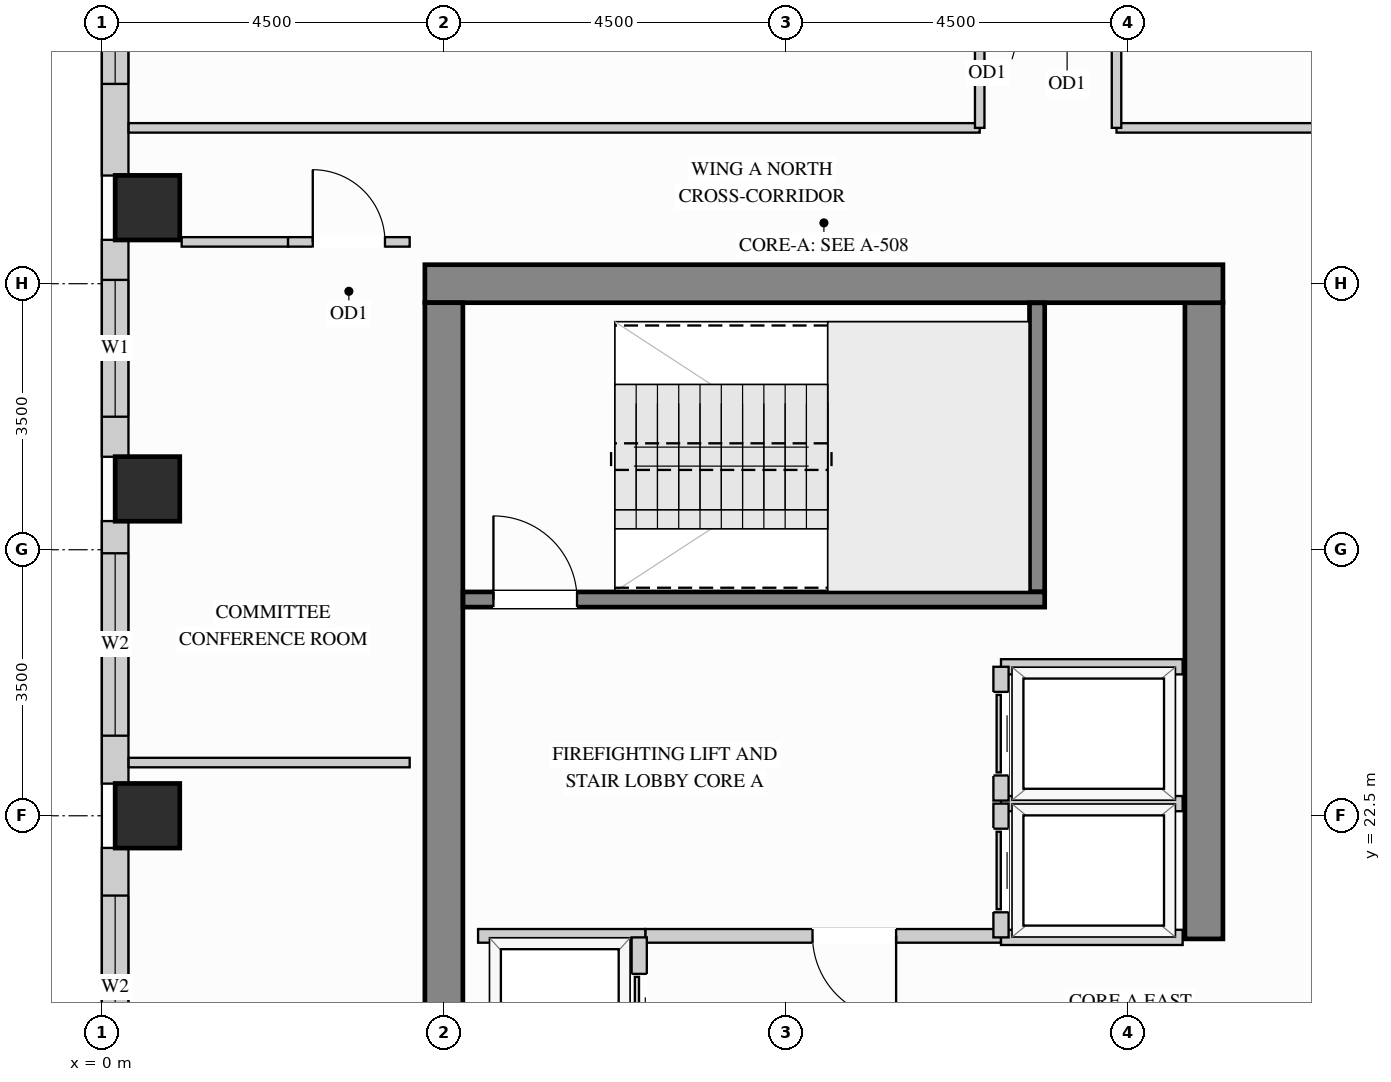
"""IFC4 building model, lengths in metres.
Left out: names, types, materials, properties, quantities, classifications, styles, units other than length and angle.
Written with IfcOpenShell. Run it as: python <this file> out.ifc"""

import sys

from ifc_helpers import new_model, si_unit, direction, frame, frame_2d, origin, origin_2d, place, context, subcontext, project, spatial, rectangle, extrude, source, transform, mapped, element, fill, save


model = new_model("IFC4")
c1 = context("Model", 3, precision=1e-05, world=origin(), true_north=direction((0.0, 1.0)))
c2 = subcontext(c1, "Body", "Model", "MODEL_VIEW")
j1 = project(units=[si_unit("LENGTHUNIT", "METRE"), si_unit("PLANEANGLEUNIT", "RADIAN")], contexts=[c1])
p1 = place(None, origin())
s1 = spatial("IfcSite", under=j1, at=p1, CompositionType="ELEMENT")
p2 = place(p1, origin())
s2 = spatial("IfcBuilding", under=s1, at=p2, CompositionType="ELEMENT")
p3 = place(p2, frame((0.0, 0.0, 223.2)))
s3 = spatial("IfcBuildingStorey", under=s2, at=p3, CompositionType="ELEMENT", Elevation=223.2)
m1 = source(origin(), c2, "Body", "SweptSolid", [
    extrude(rectangle(XDim=0.85, YDim=0.85, at=origin_2d()), origin(), (0.0, 0.0, 1.0), 3.4),
])
for number, where, z_axis, x_axis in (
    (1, (0.6, 22.5, 0.0), (0.0, 0.0, 1.0), (1.0, 0.0, 0.0)),
    (2, (0.6, 26.8, 0.0), (0.0, 0.0, 1.0), (1.0, 0.0, 0.0)),
    (3, (0.6, 30.5, 0.0), (0.0, 0.0, 1.0), (1.0, 0.0, 0.0)),
):
    element("IfcColumn", number, at=place(p3, frame(where, z_axis=z_axis, x_axis=x_axis)), inside=s3, PredefinedType="COLUMN", context=c2, shape_type="MappedRepresentation", body=[
        mapped(m1, transform((0.0, 0.0, 0.0), x_axis=(1.0, 0.0, 0.0), y_axis=(0.0, 1.0, 0.0), z_axis=(0.0, 0.0, 1.0))),
    ])
m2 = source(origin(), c2, "Body", "SweptSolid", [
    extrude(rectangle(XDim=8.37, YDim=0.5, at=frame_2d((4.185, 0.0))), origin(), (0.0, 0.0, 1.0), 3.4),
])
p4 = place(p3, frame((14.5, 20.88, 0.0), z_axis=(0.0, 0.0, 1.0), x_axis=(0.0, 1.0, 0.0)))
e4 = element("IfcWall", 4, at=p4, inside=s3, PredefinedType="SHEAR", context=c2, shape_type="MappedRepresentation", body=[
    mapped(m2, transform((0.0, 0.0, 0.0), x_axis=(1.0, 0.0, 0.0), y_axis=(0.0, 1.0, 0.0), z_axis=(0.0, 0.0, 1.0))),
])
m3 = source(origin(), c2, "Body", "SweptSolid", [
    extrude(rectangle(XDim=10.5, YDim=0.5, at=frame_2d((5.25, 0.0))), origin(), (0.0, 0.0, 1.0), 3.4),
])
p5 = place(p3, frame((4.25, 29.5, 0.0), z_axis=(0.0, 0.0, 1.0), x_axis=(1.0, 0.0, 0.0)))
e5 = element("IfcWall", 5, at=p5, inside=s3, PredefinedType="SHEAR", context=c2, shape_type="MappedRepresentation", body=[
    mapped(m3, transform((0.0, 0.0, 0.0), x_axis=(1.0, 0.0, 0.0), y_axis=(0.0, 1.0, 0.0), z_axis=(0.0, 0.0, 1.0))),
])
m4 = source(origin(), c2, "Body", "SweptSolid", [
    extrude(rectangle(XDim=20.5, YDim=0.5, at=frame_2d((10.25, 0.0))), origin(), (0.0, 0.0, 1.0), 3.4),
])
p6 = place(p3, frame((4.5, 8.75, 0.0), z_axis=(0.0, 0.0, 1.0), x_axis=(0.0, 1.0, 0.0)))
e6 = element("IfcWall", 6, at=p6, inside=s3, PredefinedType="SHEAR", context=c2, shape_type="MappedRepresentation", body=[
    mapped(m4, transform((0.0, 0.0, 0.0), x_axis=(1.0, 0.0, 0.0), y_axis=(0.0, 1.0, 0.0), z_axis=(0.0, 0.0, 1.0))),
])
p7 = place(p3, frame((0.175, 34.577, 0.0), z_axis=(0.0, 0.0, 1.0), x_axis=(0.0, -1.0, 0.0)))
e7 = element("IfcWall", 7, at=p7, inside=s3, PredefinedType="SOLIDWALL", context=c2, shape_type="SweptSolid", body=[
    extrude(rectangle(XDim=3.654, YDim=0.35, at=frame_2d((1.827, 0.0))), origin(), (0.0, 0.0, 1.0), 3.385),
])
p8 = place(p7, frame((0.648, 0.0, 0.78)))
e8 = element("IfcOpeningElement", 8, at=p8, cuts=e7, PredefinedType="OPENING", context=c2, shape_type="SweptSolid", body=[
    extrude(rectangle(XDim=1.8, YDim=2.1, at=frame_2d((0.9, 1.05))), frame((0.0, 0.185, 0.0), z_axis=(0.0, -1.0, 0.0), x_axis=(1.0, 0.0, 0.0)), (0.0, 0.0, 1.0), 0.37),
])
p9 = place(p3, frame((0.175, 30.077, 0.0), z_axis=(0.0, 0.0, 1.0), x_axis=(0.0, -1.0, 0.0)))
e9 = element("IfcWall", 9, at=p9, inside=s3, PredefinedType="SOLIDWALL", context=c2, shape_type="SweptSolid", body=[
    extrude(rectangle(XDim=2.854, YDim=0.35, at=frame_2d((1.427, 0.0))), origin(), (0.0, 0.0, 1.0), 3.385),
])
p10 = place(p9, frame((0.527, 0.0, 0.78)))
e10 = element("IfcOpeningElement", 10, at=p10, cuts=e9, PredefinedType="OPENING", context=c2, shape_type="SweptSolid", body=[
    extrude(rectangle(XDim=1.8, YDim=2.1, at=frame_2d((0.9, 1.05))), frame((0.0, 0.185, 0.0), z_axis=(0.0, -1.0, 0.0), x_axis=(1.0, 0.0, 0.0)), (0.0, 0.0, 1.0), 0.37),
])
p11 = place(p3, frame((0.175, 26.377, 0.0), z_axis=(0.0, 0.0, 1.0), x_axis=(0.0, -1.0, 0.0)))
e11 = element("IfcWall", 11, at=p11, inside=s3, PredefinedType="SOLIDWALL", context=c2, shape_type="SweptSolid", body=[
    extrude(rectangle(XDim=3.454, YDim=0.35, at=frame_2d((1.727, 0.0))), origin(), (0.0, 0.0, 1.0), 3.385),
])
p12 = place(p11, frame((0.424, 0.0, 0.78)))
e12 = element("IfcOpeningElement", 12, at=p12, cuts=e11, PredefinedType="OPENING", context=c2, shape_type="SweptSolid", body=[
    extrude(rectangle(XDim=2.4, YDim=2.1, at=frame_2d((1.2, 1.05))), frame((0.0, 0.185, 0.0), z_axis=(0.0, -1.0, 0.0), x_axis=(1.0, 0.0, 0.0)), (0.0, 0.0, 1.0), 0.37),
])
p13 = place(p3, frame((0.175, 22.077, 0.0), z_axis=(0.0, 0.0, 1.0), x_axis=(0.0, -1.0, 0.0)))
e13 = element("IfcWall", 13, at=p13, inside=s3, PredefinedType="SOLIDWALL", context=c2, shape_type="SweptSolid", body=[
    extrude(rectangle(XDim=3.654, YDim=0.35, at=frame_2d((1.827, 0.0))), origin(), (0.0, 0.0, 1.0), 3.385),
])
p14 = place(p13, frame((0.627, 0.0, 0.78)))
e14 = element("IfcOpeningElement", 14, at=p14, cuts=e13, PredefinedType="OPENING", context=c2, shape_type="SweptSolid", body=[
    extrude(rectangle(XDim=2.4, YDim=2.1, at=frame_2d((1.2, 1.05))), frame((0.0, 0.185, 0.0), z_axis=(0.0, -1.0, 0.0), x_axis=(1.0, 0.0, 0.0)), (0.0, 0.0, 1.0), 0.37),
])
p15 = place(p3, frame((7.15, 20.92, 0.0), z_axis=(0.0, 0.0, 1.0), x_axis=(1.0, 0.0, 0.0)))
e15 = element("IfcWall", 15, at=p15, inside=s3, PredefinedType="PARTITIONING", context=c2, shape_type="SweptSolid", body=[
    extrude(rectangle(XDim=4.68, YDim=0.18, at=frame_2d((2.34, 0.0))), origin(), (0.0, 0.0, 1.0), 3.385),
])
p16 = place(p15, frame((2.2, 0.0, 0.0)))
e16 = element("IfcOpeningElement", 16, at=p16, cuts=e15, PredefinedType="OPENING", context=c2, shape_type="SweptSolid", body=[
    extrude(rectangle(XDim=1.1, YDim=2.15, at=frame_2d((0.55, 1.075))), frame((0.0, 0.1, 0.0), z_axis=(0.0, -1.0, 0.0), x_axis=(1.0, 0.0, 0.0)), (0.0, 0.0, 1.0), 0.2),
])
m5 = source(origin(), c2, "Body", "SweptSolid", [
    extrude(rectangle(XDim=2.2, YDim=0.18, at=frame_2d((1.1, 0.0))), origin(), (0.0, 0.0, 1.0), 3.385),
])
p17 = place(p3, frame((4.95, 20.92, 0.0), z_axis=(0.0, 0.0, 1.0), x_axis=(1.0, 0.0, 0.0)))
e17 = element("IfcWall", 17, at=p17, inside=s3, PredefinedType="PARTITIONING", context=c2, shape_type="MappedRepresentation", body=[
    mapped(m5, transform((0.0, 0.0, 0.0), x_axis=(1.0, 0.0, 0.0), y_axis=(0.0, 1.0, 0.0), z_axis=(0.0, 0.0, 1.0))),
])
m6 = source(origin(), c2, "Body", "SweptSolid", [
    extrude(rectangle(XDim=5.798, YDim=0.125, at=frame_2d((2.899, 0.0))), origin(), (0.0, 0.0, 1.0), 3.385),
])
p18 = place(p3, frame((13.35, 31.55, 0.0), z_axis=(0.0, 0.0, 1.0), x_axis=(1.0, 0.0, 0.0)))
e18 = element("IfcWall", 18, at=p18, inside=s3, PredefinedType="PARTITIONING", context=c2, shape_type="MappedRepresentation", body=[
    mapped(m6, transform((0.0, 0.0, 0.0), x_axis=(1.0, 0.0, 0.0), y_axis=(0.0, 1.0, 0.0), z_axis=(0.0, 0.0, 1.0))),
])
m7 = source(origin(), c2, "Body", "SweptSolid", [
    extrude(rectangle(XDim=11.198, YDim=0.125, at=frame_2d((5.599, 0.0))), origin(), (0.0, 0.0, 1.0), 3.385),
])
p19 = place(p3, frame((0.352, 31.55, 0.0), z_axis=(0.0, 0.0, 1.0), x_axis=(1.0, 0.0, 0.0)))
e19 = element("IfcWall", 19, at=p19, inside=s3, PredefinedType="PARTITIONING", context=c2, shape_type="MappedRepresentation", body=[
    mapped(m7, transform((0.0, 0.0, 0.0), x_axis=(1.0, 0.0, 0.0), y_axis=(0.0, 1.0, 0.0), z_axis=(0.0, 0.0, 1.0))),
])
m8 = source(origin(), c2, "Body", "SweptSolid", [
    extrude(rectangle(XDim=1.4, YDim=0.125, at=frame_2d((0.7, 0.0))), origin(), (0.0, 0.0, 1.0), 3.385),
])
p20 = place(p3, frame((1.05, 30.05, 0.0), z_axis=(0.0, 0.0, 1.0), x_axis=(1.0, 0.0, 0.0)))
e20 = element("IfcWall", 20, at=p20, inside=s3, PredefinedType="PARTITIONING", context=c2, shape_type="MappedRepresentation", body=[
    mapped(m8, transform((0.0, 0.0, 0.0), x_axis=(1.0, 0.0, 0.0), y_axis=(0.0, 1.0, 0.0), z_axis=(0.0, 0.0, 1.0))),
])
p21 = place(p3, frame((2.45, 30.05, 0.0), z_axis=(0.0, 0.0, 1.0), x_axis=(1.0, 0.0, 0.0)))
e21 = element("IfcWall", 21, at=p21, inside=s3, PredefinedType="PARTITIONING", context=c2, shape_type="SweptSolid", body=[
    extrude(rectangle(XDim=1.6, YDim=0.125, at=frame_2d((0.8, 0.0))), origin(), (0.0, 0.0, 1.0), 3.385),
])
p22 = place(p21, frame((0.325, 0.0, 0.0)))
e22 = element("IfcOpeningElement", 22, at=p22, cuts=e21, PredefinedType="OPENING", context=c2, shape_type="SweptSolid", body=[
    extrude(rectangle(XDim=0.95, YDim=2.15, at=frame_2d((0.475, 1.075))), frame((0.0, 0.073, 0.0), z_axis=(0.0, -1.0, 0.0), x_axis=(1.0, 0.0, 0.0)), (0.0, 0.0, 1.0), 0.145),
])
p23 = place(p3, frame((13.35, 31.55, 0.0), z_axis=(0.0, 0.0, 1.0), x_axis=(0.0, 1.0, 0.0)))
e23 = element("IfcWall", 23, at=p23, inside=s3, PredefinedType="PARTITIONING", context=c2, shape_type="SweptSolid", body=[
    extrude(rectangle(XDim=3.35, YDim=0.125, at=frame_2d((1.675, 0.0))), origin(), (0.0, 0.0, 1.0), 3.385),
])
p24 = place(p23, frame((1.2, 0.0, 0.0)))
e24 = element("IfcOpeningElement", 24, at=p24, cuts=e23, PredefinedType="OPENING", context=c2, shape_type="SweptSolid", body=[
    extrude(rectangle(XDim=0.95, YDim=2.15, at=frame_2d((0.475, 1.075))), frame((0.0, 0.073, 0.0), z_axis=(0.0, -1.0, 0.0), x_axis=(1.0, 0.0, 0.0)), (0.0, 0.0, 1.0), 0.145),
])
p25 = place(p3, frame((11.55, 31.55, 0.0), z_axis=(0.0, 0.0, 1.0), x_axis=(0.0, 1.0, 0.0)))
e25 = element("IfcWall", 25, at=p25, inside=s3, PredefinedType="PARTITIONING", context=c2, shape_type="SweptSolid", body=[
    extrude(rectangle(XDim=3.35, YDim=0.125, at=frame_2d((1.675, 0.0))), origin(), (0.0, 0.0, 1.0), 3.385),
])
p26 = place(p25, frame((1.2, 0.0, 0.0)))
e26 = element("IfcOpeningElement", 26, at=p26, cuts=e25, PredefinedType="OPENING", context=c2, shape_type="SweptSolid", body=[
    extrude(rectangle(XDim=0.95, YDim=2.15, at=frame_2d((0.475, 1.075))), frame((0.0, 0.073, 0.0), z_axis=(0.0, -1.0, 0.0), x_axis=(1.0, 0.0, 0.0)), (0.0, 0.0, 1.0), 0.145),
])
m9 = source(origin(), c2, "Body", "SweptSolid", [
    extrude(rectangle(XDim=3.698, YDim=0.125, at=frame_2d((1.849, 0.0))), origin(), (0.0, 0.0, 1.0), 3.385),
])
p27 = place(p3, frame((0.352, 23.2, 0.0), z_axis=(0.0, 0.0, 1.0), x_axis=(1.0, 0.0, 0.0)))
e27 = element("IfcWall", 27, at=p27, inside=s3, PredefinedType="PARTITIONING", context=c2, shape_type="MappedRepresentation", body=[
    mapped(m9, transform((0.0, 0.0, 0.0), x_axis=(1.0, 0.0, 0.0), y_axis=(0.0, 1.0, 0.0), z_axis=(0.0, 0.0, 1.0))),
])
m10 = source(origin(), c2, "Body", "SweptSolid", [
    extrude(rectangle(XDim=2.39, YDim=0.2, at=frame_2d((1.195, 0.0))), origin(), (0.0, 0.0, 1.0), 3.385),
])
for number, where, z_axis, x_axis in (
    (28, (11.83, 22.66, 0.0), (0.0, 0.0, 1.0), (1.0, 0.0, 0.0)),
    (29, (11.83, 20.9, 0.0), (0.0, 0.0, 1.0), (1.0, 0.0, 0.0)),
):
    element("IfcWall", number, at=place(p3, frame(where, z_axis=z_axis, x_axis=x_axis)), inside=s3, PredefinedType="PARTITIONING", context=c2, shape_type="MappedRepresentation", body=[
        mapped(m10, transform((0.0, 0.0, 0.0), x_axis=(1.0, 0.0, 0.0), y_axis=(0.0, 1.0, 0.0), z_axis=(0.0, 0.0, 1.0))),
    ])
p28 = place(p3, frame((11.83, 20.9, 0.0), z_axis=(0.0, 0.0, 1.0), x_axis=(0.0, 1.0, 0.0)))
e30 = element("IfcWall", 30, at=p28, inside=s3, PredefinedType="PARTITIONING", context=c2, shape_type="SweptSolid", body=[
    extrude(rectangle(XDim=1.76, YDim=0.2, at=frame_2d((0.88, 0.0))), origin(), (0.0, 0.0, 1.0), 3.385),
])
p29 = place(p28, frame((0.33, 0.0, 0.0)))
e31 = element("IfcOpeningElement", 31, at=p29, cuts=e30, PredefinedType="OPENING", context=c2, shape_type="SweptSolid", body=[
    extrude(rectangle(XDim=1.1, YDim=2.2, at=frame_2d((0.55, 1.1))), frame((0.0, 0.11, 0.0), z_axis=(0.0, -1.0, 0.0), x_axis=(1.0, 0.0, 0.0)), (0.0, 0.0, 1.0), 0.22),
])
p30 = place(p3, frame((11.83, 24.46, 0.0), z_axis=(0.0, 0.0, 1.0), x_axis=(1.0, 0.0, 0.0)))
e32 = element("IfcWall", 32, at=p30, inside=s3, PredefinedType="PARTITIONING", context=c2, shape_type="MappedRepresentation", body=[
    mapped(m10, transform((0.0, 0.0, 0.0), x_axis=(1.0, 0.0, 0.0), y_axis=(0.0, 1.0, 0.0), z_axis=(0.0, 0.0, 1.0))),
])
p31 = place(p3, frame((11.83, 22.7, 0.0), z_axis=(0.0, 0.0, 1.0), x_axis=(0.0, 1.0, 0.0)))
e33 = element("IfcWall", 33, at=p31, inside=s3, PredefinedType="PARTITIONING", context=c2, shape_type="SweptSolid", body=[
    extrude(rectangle(XDim=1.76, YDim=0.2, at=frame_2d((0.88, 0.0))), origin(), (0.0, 0.0, 1.0), 3.385),
])
p32 = place(p31, frame((0.33, 0.0, 0.0)))
e34 = element("IfcOpeningElement", 34, at=p32, cuts=e33, PredefinedType="OPENING", context=c2, shape_type="SweptSolid", body=[
    extrude(rectangle(XDim=1.1, YDim=2.2, at=frame_2d((0.55, 1.1))), frame((0.0, 0.11, 0.0), z_axis=(0.0, -1.0, 0.0), x_axis=(1.0, 0.0, 0.0)), (0.0, 0.0, 1.0), 0.22),
])
p33 = place(p3, frame((7.07, 18.84, 0.0), z_axis=(0.0, 0.0, 1.0), x_axis=(0.0, 1.0, 0.0)))
e35 = element("IfcWall", 35, at=p33, inside=s3, PredefinedType="PARTITIONING", context=c2, shape_type="SweptSolid", body=[
    extrude(rectangle(XDim=2.06, YDim=0.2, at=frame_2d((1.03, 0.0))), origin(), (0.0, 0.0, 1.0), 3.385),
])
p34 = place(p33, frame((0.48, 0.0, 0.0)))
e36 = element("IfcOpeningElement", 36, at=p34, cuts=e35, PredefinedType="OPENING", context=c2, shape_type="SweptSolid", body=[
    extrude(rectangle(XDim=1.1, YDim=2.2, at=frame_2d((0.55, 1.1))), frame((0.0, 0.11, 0.0), z_axis=(0.0, -1.0, 0.0), x_axis=(1.0, 0.0, 0.0)), (0.0, 0.0, 1.0), 0.22),
])
m11 = source(origin(), c2, "Body", "SweptSolid", [
    extrude(rectangle(XDim=3.803, YDim=0.2, at=frame_2d((1.901, 0.0))), origin(), (0.0, 0.0, 1.0), 3.4),
])
p35 = place(p3, frame((12.305, 25.445, 0.0), z_axis=(0.0, 0.0, 1.0), x_axis=(0.0, 1.0, 0.0)))
e37 = element("IfcWall", 37, at=p35, inside=s3, PredefinedType="SHEAR", context=c2, shape_type="MappedRepresentation", body=[
    mapped(m11, transform((0.0, 0.0, 0.0), x_axis=(1.0, 0.0, 0.0), y_axis=(0.0, 1.0, 0.0), z_axis=(0.0, 0.0, 1.0))),
])
p36 = place(p3, frame((4.752, 25.345, 0.0), z_axis=(0.0, 0.0, 1.0), x_axis=(1.0, 0.0, 0.0)))
e38 = element("IfcWall", 38, at=p36, inside=s3, PredefinedType="SHEAR", context=c2, shape_type="SweptSolid", body=[
    extrude(rectangle(XDim=7.653, YDim=0.2, at=frame_2d((3.827, 0.0))), origin(), (0.0, 0.0, 1.0), 3.4),
])
p37 = place(p36, frame((0.4, 0.0, 0.0)))
e39 = element("IfcOpeningElement", 39, at=p37, cuts=e38, PredefinedType="OPENING", context=c2, shape_type="SweptSolid", body=[
    extrude(rectangle(XDim=1.1, YDim=2.15, at=frame_2d((0.55, 1.075))), frame((0.0, 0.11, 0.0), z_axis=(0.0, -1.0, 0.0), x_axis=(1.0, 0.0, 0.0)), (0.0, 0.0, 1.0), 0.22),
])
m12 = source(origin(), c2, "Body", "SweptSolid", [
    extrude(rectangle(XDim=1.1, YDim=2.15, at=frame_2d((0.55, 1.075))), frame((0.0, 0.025, 0.0), z_axis=(0.0, -1.0, 0.0), x_axis=(1.0, 0.0, 0.0)), (0.0, 0.0, 1.0), 0.05),
])
p38 = place(p16, origin())
e40 = element("IfcDoor", 40, at=p38, inside=s3, OperationType="SINGLE_SWING_RIGHT", PredefinedType="DOOR", context=c2, shape_type="MappedRepresentation", body=[
    mapped(m12, transform((0.0, 0.0, 0.0), x_axis=(1.0, 0.0, 0.0), y_axis=(0.0, 1.0, 0.0), z_axis=(0.0, 0.0, 1.0))),
])
fill(e16, e40)
m13 = source(origin(), c2, "Body", "SweptSolid", [
    extrude(rectangle(XDim=1.1, YDim=2.2, at=frame_2d((0.55, 1.1))), frame((0.0, 0.025, 0.0), z_axis=(0.0, -1.0, 0.0), x_axis=(1.0, 0.0, 0.0)), (0.0, 0.0, 1.0), 0.05),
])
p39 = place(p29, origin())
e41 = element("IfcDoor", 41, at=p39, inside=s3, OperationType="SLIDING_TO_LEFT", PredefinedType="DOOR", context=c2, shape_type="MappedRepresentation", body=[
    mapped(m13, transform((0.0, 0.0, 0.0), x_axis=(1.0, 0.0, 0.0), y_axis=(0.0, 1.0, 0.0), z_axis=(0.0, 0.0, 1.0))),
])
fill(e31, e41)
p40 = place(p32, origin())
e42 = element("IfcDoor", 42, at=p40, inside=s3, OperationType="SLIDING_TO_LEFT", PredefinedType="DOOR", context=c2, shape_type="MappedRepresentation", body=[
    mapped(m13, transform((0.0, 0.0, 0.0), x_axis=(1.0, 0.0, 0.0), y_axis=(0.0, 1.0, 0.0), z_axis=(0.0, 0.0, 1.0))),
])
fill(e34, e42)
p41 = place(p34, origin())
e43 = element("IfcDoor", 43, at=p41, inside=s3, OperationType="SLIDING_TO_LEFT", PredefinedType="DOOR", context=c2, shape_type="MappedRepresentation", body=[
    mapped(m13, transform((0.0, 0.0, 0.0), x_axis=(1.0, 0.0, 0.0), y_axis=(0.0, 1.0, 0.0), z_axis=(0.0, 0.0, 1.0))),
])
fill(e36, e43)
m14 = source(origin(), c2, "Body", "SweptSolid", [
    extrude(rectangle(XDim=0.95, YDim=2.15, at=frame_2d((0.475, 1.075))), frame((0.0, 0.025, 0.0), z_axis=(0.0, -1.0, 0.0), x_axis=(1.0, 0.0, 0.0)), (0.0, 0.0, 1.0), 0.05),
])
p42 = place(p22, origin())
e44 = element("IfcDoor", 44, at=p42, inside=s3, OperationType="SINGLE_SWING_LEFT", PredefinedType="DOOR", context=c2, shape_type="MappedRepresentation", body=[
    mapped(m14, transform((0.0, 0.0, 0.0), x_axis=(1.0, 0.0, 0.0), y_axis=(0.0, 1.0, 0.0), z_axis=(0.0, 0.0, 1.0))),
])
fill(e22, e44)
m15 = source(origin(), c2, "Body", "SweptSolid", [
    extrude(rectangle(XDim=1.1, YDim=2.15, at=frame_2d((0.55, 1.075))), frame((0.0, 0.025, 0.0), z_axis=(0.0, -1.0, 0.0), x_axis=(1.0, 0.0, 0.0)), (0.0, 0.0, 1.0), 0.05),
])
p43 = place(p37, origin())
e45 = element("IfcDoor", 45, at=p43, inside=s3, OperationType="SINGLE_SWING_LEFT", PredefinedType="DOOR", context=c2, shape_type="MappedRepresentation", body=[
    mapped(m15, transform((0.0, 0.0, 0.0), x_axis=(1.0, 0.0, 0.0), y_axis=(0.0, 1.0, 0.0), z_axis=(0.0, 0.0, 1.0))),
])
fill(e39, e45)
m16 = source(origin(), c2, "Body", "SweptSolid", [
    extrude(rectangle(XDim=1.8, YDim=2.1, at=frame_2d((0.9, 1.05))), frame((0.0, 0.03, 0.0), z_axis=(0.0, -1.0, 0.0), x_axis=(1.0, 0.0, 0.0)), (0.0, 0.0, 1.0), 0.06),
])
p44 = place(p8, origin())
e46 = element("IfcWindow", 46, at=p44, inside=s3, PartitioningType="SINGLE_PANEL", PredefinedType="WINDOW", context=c2, shape_type="MappedRepresentation", body=[
    mapped(m16, transform((0.0, 0.0, 0.0), x_axis=(1.0, 0.0, 0.0), y_axis=(0.0, 1.0, 0.0), z_axis=(0.0, 0.0, 1.0))),
])
fill(e8, e46)
p45 = place(p10, origin())
e47 = element("IfcWindow", 47, at=p45, inside=s3, PartitioningType="SINGLE_PANEL", PredefinedType="WINDOW", context=c2, shape_type="MappedRepresentation", body=[
    mapped(m16, transform((0.0, 0.0, 0.0), x_axis=(1.0, 0.0, 0.0), y_axis=(0.0, 1.0, 0.0), z_axis=(0.0, 0.0, 1.0))),
])
fill(e10, e47)
m17 = source(origin(), c2, "Body", "SweptSolid", [
    extrude(rectangle(XDim=2.4, YDim=2.1, at=frame_2d((1.2, 1.05))), frame((0.0, 0.03, 0.0), z_axis=(0.0, -1.0, 0.0), x_axis=(1.0, 0.0, 0.0)), (0.0, 0.0, 1.0), 0.06),
])
p46 = place(p12, origin())
e48 = element("IfcWindow", 48, at=p46, inside=s3, PartitioningType="SINGLE_PANEL", PredefinedType="WINDOW", context=c2, shape_type="MappedRepresentation", body=[
    mapped(m17, transform((0.0, 0.0, 0.0), x_axis=(1.0, 0.0, 0.0), y_axis=(0.0, 1.0, 0.0), z_axis=(0.0, 0.0, 1.0))),
])
fill(e12, e48)
p47 = place(p14, origin())
e49 = element("IfcWindow", 49, at=p47, inside=s3, PartitioningType="SINGLE_PANEL", PredefinedType="WINDOW", context=c2, shape_type="MappedRepresentation", body=[
    mapped(m17, transform((0.0, 0.0, 0.0), x_axis=(1.0, 0.0, 0.0), y_axis=(0.0, 1.0, 0.0), z_axis=(0.0, 0.0, 1.0))),
])
fill(e14, e49)
save(model, sys.argv[1])
